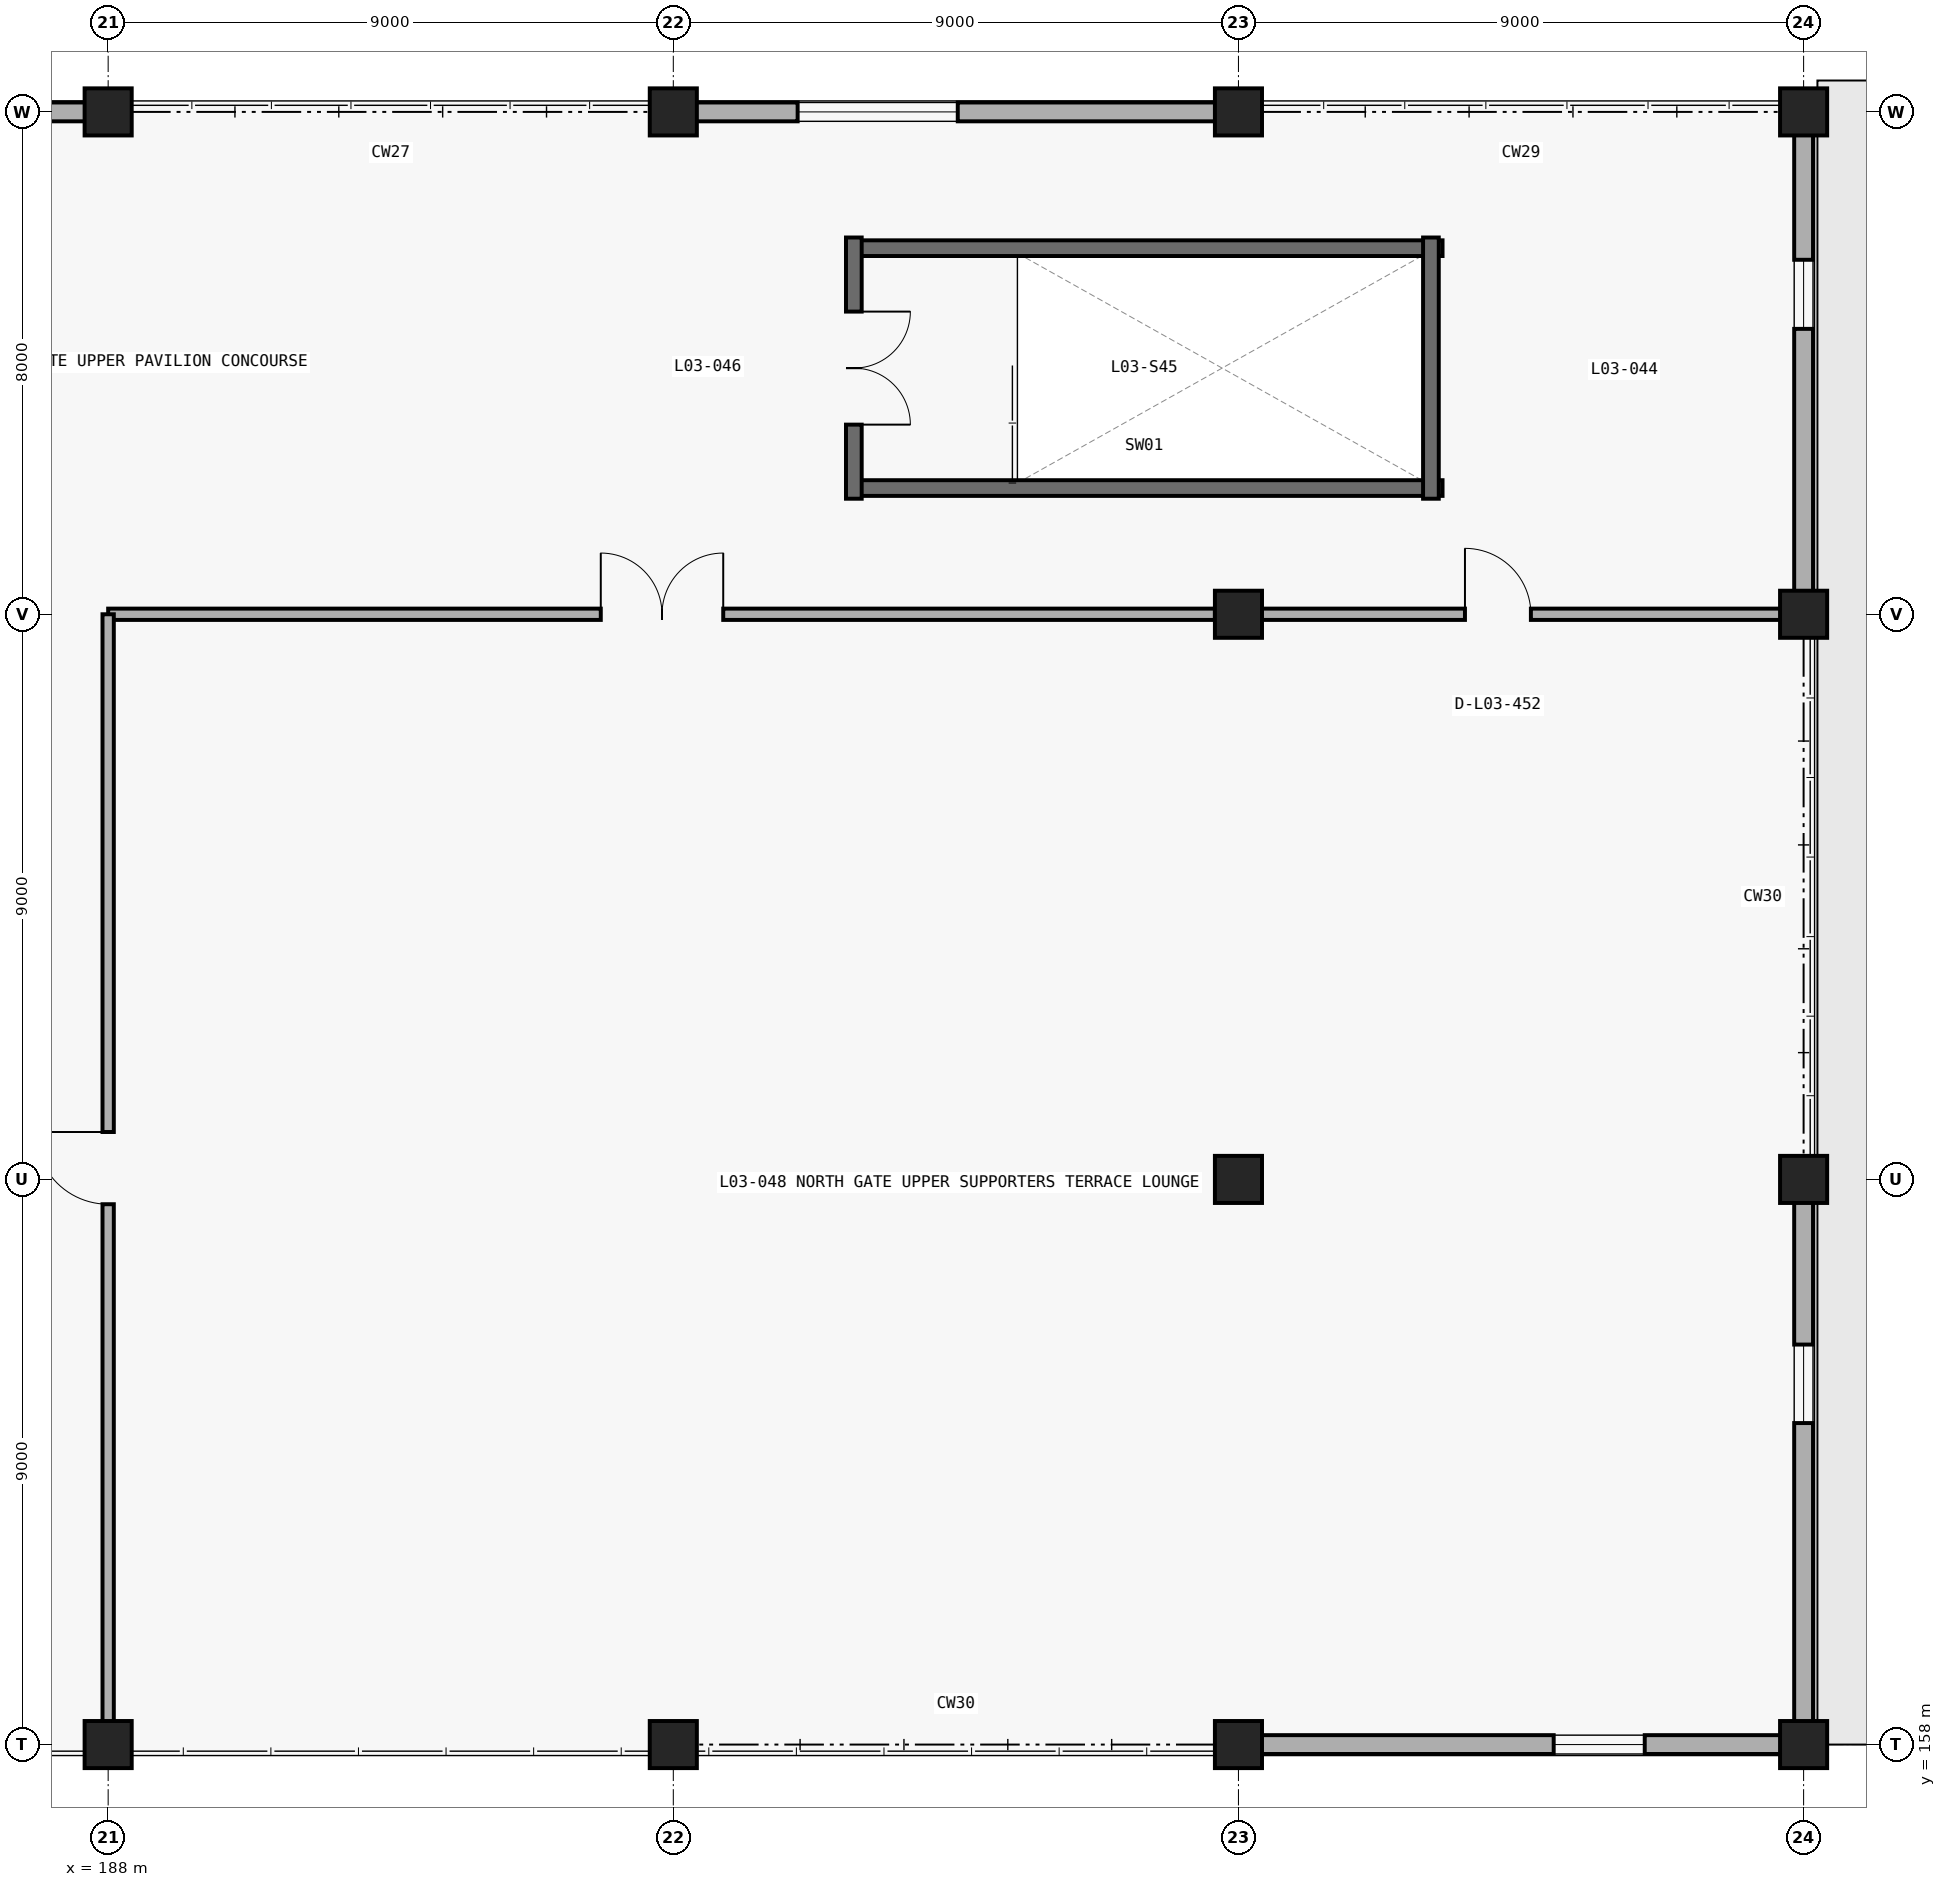
"""IFC4 building model, lengths in metres.
Left out: names, types, materials, properties, quantities, classifications, styles, units other than length and angle.
Written with IfcOpenShell. Run it as: python <this file> out.ifc"""

import sys

from ifc_helpers import new_model, si_unit, direction, frame, frame_2d, origin, origin_2d, place, context, subcontext, project, spatial, rectangle, extrude, element, fill, save


model = new_model("IFC4")
c1 = context("Model", 3, precision=1e-05, world=origin(), true_north=direction((0.0, 1.0)))
c2 = subcontext(c1, "Body", "Model", "MODEL_VIEW")
j1 = project(units=[si_unit("LENGTHUNIT", "METRE"), si_unit("PLANEANGLEUNIT", "RADIAN")], contexts=[c1])
p1 = place(None, origin())
s1 = spatial("IfcSite", under=j1, at=p1, CompositionType="ELEMENT")
p2 = place(p1, origin())
s2 = spatial("IfcBuilding", under=s1, at=p2, CompositionType="ELEMENT")
p3 = place(p2, frame((0.0, 0.0, 15.0)))
s3 = spatial("IfcBuildingStorey", under=s2, at=p3, CompositionType="ELEMENT", Elevation=15.0)
for number, where, z_axis, x_axis in (
    (1, (188.0, 158.0, 0.0), (0.0, 0.0, 1.0), (1.0, 0.0, 0.0)),
    (2, (188.0, 184.0, 0.0), (0.0, 0.0, 1.0), (1.0, 0.0, 0.0)),
    (3, (197.0, 158.0, 0.0), (0.0, 0.0, 1.0), (1.0, 0.0, 0.0)),
    (4, (197.0, 184.0, 0.0), (0.0, 0.0, 1.0), (1.0, 0.0, 0.0)),
    (5, (206.0, 158.0, 0.0), (0.0, 0.0, 1.0), (1.0, 0.0, 0.0)),
    (6, (206.0, 167.0, 0.0), (0.0, 0.0, 1.0), (1.0, 0.0, 0.0)),
    (7, (206.0, 176.0, 0.0), (0.0, 0.0, 1.0), (1.0, 0.0, 0.0)),
    (8, (206.0, 184.0, 0.0), (0.0, 0.0, 1.0), (1.0, 0.0, 0.0)),
    (9, (215.0, 158.0, 0.0), (0.0, 0.0, 1.0), (1.0, 0.0, 0.0)),
    (10, (215.0, 167.0, 0.0), (0.0, 0.0, 1.0), (1.0, 0.0, 0.0)),
    (11, (215.0, 176.0, 0.0), (0.0, 0.0, 1.0), (1.0, 0.0, 0.0)),
    (12, (215.0, 184.0, 0.0), (0.0, 0.0, 1.0), (1.0, 0.0, 0.0)),
):
    element("IfcColumn", number, at=place(p3, frame(where, z_axis=z_axis, x_axis=x_axis)), inside=s3, PredefinedType="COLUMN", context=c2, shape_type="SweptSolid", body=[
        extrude(rectangle(XDim=0.75, YDim=0.75, at=origin_2d()), origin(), (0.0, 0.0, 1.0), 4.8),
    ])
p4 = place(p3, frame((179.35, 184.0, 0.0), z_axis=(0.0, 0.0, 1.0), x_axis=(1.0, 0.0, 0.0)))
e13 = element("IfcWall", 13, at=p4, inside=s3, PredefinedType="STANDARD", context=c2, shape_type="SweptSolid", body=[
    extrude(rectangle(XDim=8.3, YDim=0.3, at=frame_2d((4.15, 0.0))), origin(), (0.0, 0.0, 1.0), 3.823),
])
p5 = place(p4, frame((1.78, 0.0, 0.95)))
e14 = element("IfcOpeningElement", 14, at=p5, cuts=e13, PredefinedType="OPENING", context=c2, shape_type="SweptSolid", body=[
    extrude(rectangle(XDim=2.25, YDim=2.15, at=frame_2d((1.125, 1.075))), frame((0.0, 0.16, 0.0), z_axis=(0.0, -1.0, 0.0), x_axis=(1.0, 0.0, 0.0)), (0.0, 0.0, 1.0), 0.32),
])
p6 = place(p3, frame((197.35, 184.0, 0.0), z_axis=(0.0, 0.0, 1.0), x_axis=(1.0, 0.0, 0.0)))
e15 = element("IfcWall", 15, at=p6, inside=s3, PredefinedType="STANDARD", context=c2, shape_type="SweptSolid", body=[
    extrude(rectangle(XDim=8.3, YDim=0.3, at=frame_2d((4.15, 0.0))), origin(), (0.0, 0.0, 1.0), 3.823),
])
p7 = place(p6, frame((1.63, 0.0, 0.95)))
e16 = element("IfcOpeningElement", 16, at=p7, cuts=e15, PredefinedType="OPENING", context=c2, shape_type="SweptSolid", body=[
    extrude(rectangle(XDim=2.55, YDim=2.2, at=frame_2d((1.275, 1.1))), frame((0.0, 0.16, 0.0), z_axis=(0.0, -1.0, 0.0), x_axis=(1.0, 0.0, 0.0)), (0.0, 0.0, 1.0), 0.32),
])
p8 = place(p3, frame((215.0, 183.65, 0.0), z_axis=(0.0, 0.0, 1.0), x_axis=(0.0, -1.0, 0.0)))
e17 = element("IfcWall", 17, at=p8, inside=s3, PredefinedType="STANDARD", context=c2, shape_type="SweptSolid", body=[
    extrude(rectangle(XDim=7.3, YDim=0.3, at=frame_2d((3.65, 0.0))), origin(), (0.0, 0.0, 1.0), 3.857),
])
p9 = place(p8, frame((2.005, 0.0, 0.95)))
e18 = element("IfcOpeningElement", 18, at=p9, cuts=e17, PredefinedType="OPENING", context=c2, shape_type="SweptSolid", body=[
    extrude(rectangle(XDim=1.1, YDim=1.65, at=frame_2d((0.55, 0.825))), frame((0.0, 0.16, 0.0), z_axis=(0.0, -1.0, 0.0), x_axis=(1.0, 0.0, 0.0)), (0.0, 0.0, 1.0), 0.32),
])
p10 = place(p3, frame((215.0, 166.65, 0.0), z_axis=(0.0, 0.0, 1.0), x_axis=(0.0, -1.0, 0.0)))
e19 = element("IfcWall", 19, at=p10, inside=s3, PredefinedType="STANDARD", context=c2, shape_type="SweptSolid", body=[
    extrude(rectangle(XDim=8.3, YDim=0.3, at=frame_2d((4.15, 0.0))), origin(), (0.0, 0.0, 1.0), 3.857),
])
p11 = place(p10, frame((2.28, 0.0, 0.95)))
e20 = element("IfcOpeningElement", 20, at=p11, cuts=e19, PredefinedType="OPENING", context=c2, shape_type="SweptSolid", body=[
    extrude(rectangle(XDim=1.25, YDim=1.95, at=frame_2d((0.625, 0.975))), frame((0.0, 0.16, 0.0), z_axis=(0.0, -1.0, 0.0), x_axis=(1.0, 0.0, 0.0)), (0.0, 0.0, 1.0), 0.32),
])
p12 = place(p3, frame((214.65, 158.0, 0.0), z_axis=(0.0, 0.0, 1.0), x_axis=(-1.0, 0.0, 0.0)))
e21 = element("IfcWall", 21, at=p12, inside=s3, PredefinedType="STANDARD", context=c2, shape_type="SweptSolid", body=[
    extrude(rectangle(XDim=8.3, YDim=0.3, at=frame_2d((4.15, 0.0))), origin(), (0.0, 0.0, 1.0), 3.823),
])
p13 = place(p12, frame((2.18, 0.0, 0.95)))
e22 = element("IfcOpeningElement", 22, at=p13, cuts=e21, PredefinedType="OPENING", context=c2, shape_type="SweptSolid", body=[
    extrude(rectangle(XDim=1.45, YDim=1.85, at=frame_2d((0.725, 0.925))), frame((0.0, 0.16, 0.0), z_axis=(0.0, -1.0, 0.0), x_axis=(1.0, 0.0, 0.0)), (0.0, 0.0, 1.0), 0.32),
])
for number, where, z_axis, x_axis in (
    (23, (199.75, 178.01, 0.0), (0.0, 0.0, 1.0), (1.0, 0.0, 0.0)),
    (24, (209.25, 181.83, 0.0), (0.0, 0.0, 1.0), (-1.0, 0.0, 0.0)),
):
    element("IfcWall", number, at=place(p3, frame(where, z_axis=z_axis, x_axis=x_axis)), inside=s3, PredefinedType="SHEAR", context=c2, shape_type="SweptSolid", body=[
        extrude(rectangle(XDim=9.5, YDim=0.25, at=frame_2d((4.75, 0.0))), origin(), (0.0, 0.0, 1.0), 4.54),
    ])
p14 = place(p3, frame((199.875, 182.0, 0.0), z_axis=(0.0, 0.0, 1.0), x_axis=(0.0, -1.0, 0.0)))
e25 = element("IfcWall", 25, at=p14, inside=s3, PredefinedType="SHEAR", context=c2, shape_type="SweptSolid", body=[
    extrude(rectangle(XDim=4.16, YDim=0.25, at=frame_2d((2.08, 0.0))), origin(), (0.0, 0.0, 1.0), 4.54),
])
p15 = place(p14, frame((1.18, 0.0, 0.0)))
e26 = element("IfcOpeningElement", 26, at=p15, cuts=e25, PredefinedType="OPENING", context=c2, shape_type="SweptSolid", body=[
    extrude(rectangle(XDim=1.8, YDim=2.25, at=frame_2d((0.9, 1.125))), frame((0.0, 0.135, 0.0), z_axis=(0.0, -1.0, 0.0), x_axis=(1.0, 0.0, 0.0)), (0.0, 0.0, 1.0), 0.27),
])
p16 = place(p3, frame((209.065, 177.84, 0.0), z_axis=(0.0, 0.0, 1.0), x_axis=(0.0, 1.0, 0.0)))
e27 = element("IfcWall", 27, at=p16, inside=s3, PredefinedType="SHEAR", context=c2, shape_type="SweptSolid", body=[
    extrude(rectangle(XDim=4.16, YDim=0.25, at=frame_2d((2.08, 0.0))), origin(), (0.0, 0.0, 1.0), 4.54),
])
p17 = place(p3, frame((188.0, 176.0, 0.0), z_axis=(0.0, 0.0, 1.0), x_axis=(1.0, 0.0, 0.0)))
e28 = element("IfcWall", 28, at=p17, inside=s3, PredefinedType="PARTITIONING", context=c2, shape_type="SweptSolid", body=[
    extrude(rectangle(XDim=17.64, YDim=0.18, at=frame_2d((8.82, 0.0))), origin(), (0.0, 0.0, 1.0), 4.52),
])
p18 = place(p17, frame((7.845, 0.0, 0.0)))
e29 = element("IfcOpeningElement", 29, at=p18, cuts=e28, PredefinedType="OPENING", context=c2, shape_type="SweptSolid", body=[
    extrude(rectangle(XDim=1.95, YDim=2.35, at=frame_2d((0.975, 1.175))), frame((0.0, 0.1, 0.0), z_axis=(0.0, -1.0, 0.0), x_axis=(1.0, 0.0, 0.0)), (0.0, 0.0, 1.0), 0.2),
])
p19 = place(p3, frame((205.625, 176.0, 0.0), z_axis=(0.0, 0.0, 1.0), x_axis=(1.0, 0.0, 0.0)))
e30 = element("IfcWall", 30, at=p19, inside=s3, PredefinedType="PARTITIONING", context=c2, shape_type="SweptSolid", body=[
    extrude(rectangle(XDim=9.015, YDim=0.18, at=frame_2d((4.507, 0.0))), origin(), (0.0, 0.0, 1.0), 3.823),
])
p20 = place(p19, frame((3.982, 0.0, 0.0)))
e31 = element("IfcOpeningElement", 31, at=p20, cuts=e30, PredefinedType="OPENING", context=c2, shape_type="SweptSolid", body=[
    extrude(rectangle(XDim=1.05, YDim=2.15, at=frame_2d((0.525, 1.075))), frame((0.0, 0.1, 0.0), z_axis=(0.0, -1.0, 0.0), x_axis=(1.0, 0.0, 0.0)), (0.0, 0.0, 1.0), 0.2),
])
p21 = place(p3, frame((188.0, 158.36, 0.0), z_axis=(0.0, 0.0, 1.0), x_axis=(0.0, 1.0, 0.0)))
e32 = element("IfcWall", 32, at=p21, inside=s3, PredefinedType="PARTITIONING", context=c2, shape_type="SweptSolid", body=[
    extrude(rectangle(XDim=17.64, YDim=0.18, at=frame_2d((8.82, 0.0))), origin(), (0.0, 0.0, 1.0), 4.52),
])
p22 = place(p21, frame((8.245, 0.0, 0.0)))
e33 = element("IfcOpeningElement", 33, at=p22, cuts=e32, PredefinedType="OPENING", context=c2, shape_type="SweptSolid", body=[
    extrude(rectangle(XDim=1.15, YDim=2.2, at=frame_2d((0.575, 1.1))), frame((0.0, 0.1, 0.0), z_axis=(0.0, -1.0, 0.0), x_axis=(1.0, 0.0, 0.0)), (0.0, 0.0, 1.0), 0.2),
])
p23 = place(p7, origin())
e34 = element("IfcWindow", 34, at=p23, inside=s3, PartitioningType="SINGLE_PANEL", PredefinedType="WINDOW", context=c2, shape_type="SweptSolid", body=[
    extrude(rectangle(XDim=2.55, YDim=2.2, at=frame_2d((1.275, 1.1))), frame((0.0, 0.03, 0.0), z_axis=(0.0, -1.0, 0.0), x_axis=(1.0, 0.0, 0.0)), (0.0, 0.0, 1.0), 0.06),
])
fill(e16, e34)
p24 = place(p9, origin())
e35 = element("IfcWindow", 35, at=p24, inside=s3, PartitioningType="SINGLE_PANEL", PredefinedType="WINDOW", context=c2, shape_type="SweptSolid", body=[
    extrude(rectangle(XDim=1.1, YDim=1.65, at=frame_2d((0.55, 0.825))), frame((0.0, 0.03, 0.0), z_axis=(0.0, -1.0, 0.0), x_axis=(1.0, 0.0, 0.0)), (0.0, 0.0, 1.0), 0.06),
])
fill(e18, e35)
p25 = place(p11, origin())
e36 = element("IfcWindow", 36, at=p25, inside=s3, PartitioningType="SINGLE_PANEL", PredefinedType="WINDOW", context=c2, shape_type="SweptSolid", body=[
    extrude(rectangle(XDim=1.25, YDim=1.95, at=frame_2d((0.625, 0.975))), frame((0.0, 0.03, 0.0), z_axis=(0.0, -1.0, 0.0), x_axis=(1.0, 0.0, 0.0)), (0.0, 0.0, 1.0), 0.06),
])
fill(e20, e36)
p26 = place(p13, origin())
e37 = element("IfcWindow", 37, at=p26, inside=s3, PartitioningType="SINGLE_PANEL", PredefinedType="WINDOW", context=c2, shape_type="SweptSolid", body=[
    extrude(rectangle(XDim=1.45, YDim=1.85, at=frame_2d((0.725, 0.925))), frame((0.0, 0.03, 0.0), z_axis=(0.0, -1.0, 0.0), x_axis=(1.0, 0.0, 0.0)), (0.0, 0.0, 1.0), 0.06),
])
fill(e22, e37)
p27 = place(p15, origin())
e38 = element("IfcDoor", 38, at=p27, inside=s3, OperationType="DOUBLE_DOOR_SINGLE_SWING", PredefinedType="DOOR", context=c2, shape_type="SweptSolid", body=[
    extrude(rectangle(XDim=1.8, YDim=2.25, at=frame_2d((0.9, 1.125))), frame((0.0, 0.025, 0.0), z_axis=(0.0, -1.0, 0.0), x_axis=(1.0, 0.0, 0.0)), (0.0, 0.0, 1.0), 0.05),
])
fill(e26, e38)
p28 = place(p18, origin())
e39 = element("IfcDoor", 39, at=p28, inside=s3, OperationType="DOUBLE_DOOR_SINGLE_SWING", PredefinedType="DOOR", context=c2, shape_type="SweptSolid", body=[
    extrude(rectangle(XDim=1.95, YDim=2.35, at=frame_2d((0.975, 1.175))), frame((0.0, 0.025, 0.0), z_axis=(0.0, -1.0, 0.0), x_axis=(1.0, 0.0, 0.0)), (0.0, 0.0, 1.0), 0.05),
])
fill(e29, e39)
p29 = place(p20, origin())
e40 = element("IfcDoor", 40, at=p29, inside=s3, OperationType="SINGLE_SWING_LEFT", PredefinedType="DOOR", context=c2, shape_type="SweptSolid", body=[
    extrude(rectangle(XDim=1.05, YDim=2.15, at=frame_2d((0.525, 1.075))), frame((0.0, 0.025, 0.0), z_axis=(0.0, -1.0, 0.0), x_axis=(1.0, 0.0, 0.0)), (0.0, 0.0, 1.0), 0.05),
])
fill(e31, e40)
p30 = place(p22, origin())
e41 = element("IfcDoor", 41, at=p30, inside=s3, OperationType="SINGLE_SWING_RIGHT", PredefinedType="DOOR", context=c2, shape_type="SweptSolid", body=[
    extrude(rectangle(XDim=1.15, YDim=2.2, at=frame_2d((0.575, 1.1))), frame((0.0, 0.025, 0.0), z_axis=(0.0, -1.0, 0.0), x_axis=(1.0, 0.0, 0.0)), (0.0, 0.0, 1.0), 0.05),
])
fill(e33, e41)
save(model, sys.argv[1])
